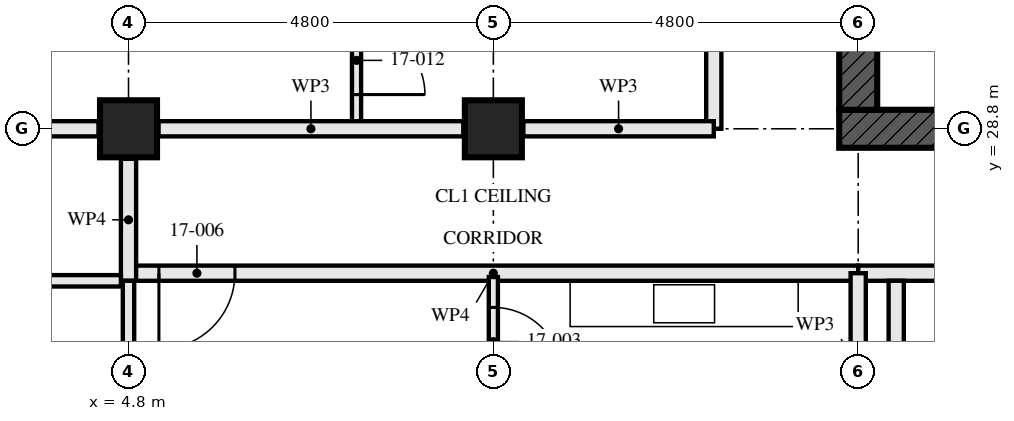
"""IFC4 building model, lengths in metres.
Left out: names, types, materials, properties, quantities, classifications, styles, units other than length and angle.
Written with IfcOpenShell. Run it as: python <this file> out.ifc"""

import sys

from ifc_helpers import new_model, si_unit, direction, frame, frame_2d, origin, origin_2d, place, context, subcontext, project, spatial, rectangle, hollow_rectangle, extrude, element, fill, save


model = new_model("IFC4")
c1 = context("Model", 3, precision=1e-05, world=origin(), true_north=direction((0.0, 1.0)))
c2 = subcontext(c1, "Body", "Model", "MODEL_VIEW")
j1 = project(units=[si_unit("LENGTHUNIT", "METRE"), si_unit("PLANEANGLEUNIT", "RADIAN")], contexts=[c1])
p1 = place(None, origin())
s1 = spatial("IfcSite", under=j1, at=p1, CompositionType="ELEMENT")
p2 = place(p1, origin())
s2 = spatial("IfcBuilding", under=s1, at=p2, CompositionType="ELEMENT")
p3 = place(p2, frame((0.0, 0.0, 65.5)))
s3 = spatial("IfcBuildingStorey", under=s2, at=p3, CompositionType="ELEMENT", Elevation=65.5)
for number, where, z_axis, x_axis in (
    (1, (4.8, 28.8, 0.0), (0.0, 0.0, 1.0), (0.0, 1.0, 0.0)),
    (2, (9.6, 28.8, 0.0), (0.0, 0.0, 1.0), (0.0, 1.0, 0.0)),
):
    element("IfcColumn", number, at=place(p3, frame(where, z_axis=z_axis, x_axis=x_axis)), inside=s3, PredefinedType="COLUMN", context=c2, shape_type="SweptSolid", body=[
        extrude(hollow_rectangle(XDim=0.75, YDim=0.75, WallThickness=0.08, at=origin_2d()), origin(), (0.0, 0.0, 1.0), 3.5),
    ])
p4 = place(p3, frame((14.15, 28.8, -0.17), z_axis=(0.0, 0.0, 1.0), x_axis=(1.0, 0.0, 0.0)))
e3 = element("IfcWall", 3, at=p4, inside=s3, PredefinedType="SHEAR", context=c2, shape_type="SweptSolid", body=[
    extrude(rectangle(XDim=14.9, YDim=0.5, at=frame_2d((7.45, 0.0))), origin(), (0.0, 0.0, 1.0), 3.5),
])
p5 = place(p4, frame((6.85, 0.0, 0.17)))
e4 = element("IfcOpeningElement", 4, at=p5, cuts=e3, PredefinedType="OPENING", context=c2, shape_type="SweptSolid", body=[
    extrude(rectangle(XDim=1.2, YDim=2.1, at=frame_2d((0.6, 1.05))), frame((0.0, 0.26, 0.0), z_axis=(0.0, -1.0, 0.0), x_axis=(1.0, 0.0, 0.0)), (0.0, 0.0, 1.0), 0.521),
])
p6 = place(p3, frame((14.4, 42.95, -0.17), z_axis=(0.0, 0.0, 1.0), x_axis=(0.0, -1.0, 0.0)))
e5 = element("IfcWall", 5, at=p6, inside=s3, PredefinedType="SHEAR", context=c2, shape_type="SweptSolid", body=[
    extrude(rectangle(XDim=13.9, YDim=0.5, at=frame_2d((6.95, 0.0))), origin(), (0.0, 0.0, 1.0), 3.5),
])
p7 = place(p6, frame((6.35, 0.0, 0.17)))
e6 = element("IfcOpeningElement", 6, at=p7, cuts=e5, PredefinedType="OPENING", context=c2, shape_type="SweptSolid", body=[
    extrude(rectangle(XDim=1.2, YDim=2.1, at=frame_2d((0.6, 1.05))), frame((0.0, 0.26, 0.0), z_axis=(0.0, -1.0, 0.0), x_axis=(1.0, 0.0, 0.0)), (0.0, 0.0, 1.0), 0.521),
])
p8 = place(p3, frame((4.8, 23.8, 0.0), z_axis=(0.0, 0.0, 1.0), x_axis=(0.0, 1.0, 0.0)))
e7 = element("IfcWall", 7, at=p8, inside=s3, PredefinedType="PARTITIONING", context=c2, shape_type="SweptSolid", body=[
    extrude(rectangle(XDim=3.0, YDim=0.15, at=frame_2d((1.5, 0.0))), origin(), (0.0, 0.0, 1.0), 2.55),
])
p9 = place(p8, frame((1.05, 0.0, 0.0)))
e8 = element("IfcOpeningElement", 8, at=p9, cuts=e7, PredefinedType="OPENING", context=c2, shape_type="SweptSolid", body=[
    extrude(rectangle(XDim=0.9, YDim=2.1, at=frame_2d((0.45, 1.05))), frame((0.0, 0.085, 0.0), z_axis=(0.0, -1.0, 0.0), x_axis=(1.0, 0.0, 0.0)), (0.0, 0.0, 1.0), 0.171),
])
p10 = place(p3, frame((9.6, 22.2, 0.0), z_axis=(0.0, 0.0, 1.0), x_axis=(0.0, 1.0, 0.0)))
e9 = element("IfcWall", 9, at=p10, inside=s3, PredefinedType="PARTITIONING", context=c2, shape_type="SweptSolid", body=[
    extrude(rectangle(XDim=4.65, YDim=0.12, at=frame_2d((2.325, 0.0))), origin(), (0.0, 0.0, 1.0), 2.55),
])
p11 = place(p10, frame((3.35, 0.0, 0.0)))
e10 = element("IfcOpeningElement", 10, at=p11, cuts=e9, PredefinedType="OPENING", context=c2, shape_type="SweptSolid", body=[
    extrude(rectangle(XDim=0.9, YDim=2.1, at=frame_2d((0.45, 1.05))), frame((0.0, 0.071, 0.0), z_axis=(0.0, -1.0, 0.0), x_axis=(1.0, 0.0, 0.0)), (0.0, 0.0, 1.0), 0.141),
])
p12 = place(p3, frame((4.8, 26.9, 0.0), z_axis=(0.0, 0.0, 1.0), x_axis=(1.0, 0.0, 0.0)))
e11 = element("IfcWall", 11, at=p12, inside=s3, PredefinedType="PARTITIONING", context=c2, shape_type="SweptSolid", body=[
    extrude(rectangle(XDim=9.6, YDim=0.2, at=frame_2d((4.8, 0.0))), origin(), (0.0, 0.0, 1.0), 3.33),
])
p13 = place(p12, frame((0.4, 0.0, 0.0)))
e12 = element("IfcOpeningElement", 12, at=p13, cuts=e11, PredefinedType="OPENING", context=c2, shape_type="SweptSolid", body=[
    extrude(rectangle(XDim=1.0, YDim=2.1, at=frame_2d((0.5, 1.05))), frame((0.0, 0.111, 0.0), z_axis=(0.0, -1.0, 0.0), x_axis=(1.0, 0.0, 0.0)), (0.0, 0.0, 1.0), 0.221),
])
p14 = place(p3, frame((4.8, 26.8, 0.0), z_axis=(0.0, 0.0, 1.0), x_axis=(0.0, 1.0, 0.0)))
e13 = element("IfcWall", 13, at=p14, inside=s3, PredefinedType="PARTITIONING", context=c2, shape_type="SweptSolid", body=[
    extrude(rectangle(XDim=1.605, YDim=0.2, at=frame_2d((0.802, 0.0))), origin(), (0.0, 0.0, 1.0), 3.33),
])
p15 = place(p3, frame((7.8, 33.6, 0.0), z_axis=(0.0, 0.0, 1.0), x_axis=(0.0, -1.0, 0.0)))
e14 = element("IfcWall", 14, at=p15, inside=s3, PredefinedType="PARTITIONING", context=c2, shape_type="SweptSolid", body=[
    extrude(rectangle(XDim=4.8, YDim=0.12, at=frame_2d((2.4, 0.0))), origin(), (0.0, 0.0, 1.0), 3.33),
])
p16 = place(p15, frame((3.45, 0.0, 0.0)))
e15 = element("IfcOpeningElement", 15, at=p16, cuts=e14, PredefinedType="OPENING", context=c2, shape_type="SweptSolid", body=[
    extrude(rectangle(XDim=0.9, YDim=2.1, at=frame_2d((0.45, 1.05))), frame((0.0, 0.071, 0.0), z_axis=(0.0, -1.0, 0.0), x_axis=(1.0, 0.0, 0.0)), (0.0, 0.0, 1.0), 0.141),
])
p17 = place(p3, frame((12.5, 43.2, 0.0), z_axis=(0.0, 0.0, 1.0), x_axis=(0.0, -1.0, 0.0)))
e16 = element("IfcWall", 16, at=p17, inside=s3, PredefinedType="PARTITIONING", context=c2, shape_type="SweptSolid", body=[
    extrude(rectangle(XDim=14.4, YDim=0.2, at=frame_2d((7.2, 0.0))), origin(), (0.0, 0.0, 1.0), 2.55),
])
p18 = place(p17, frame((1.4, 0.0, 0.0)))
e17 = element("IfcOpeningElement", 17, at=p18, cuts=e16, PredefinedType="OPENING", context=c2, shape_type="SweptSolid", body=[
    extrude(rectangle(XDim=1.0, YDim=2.1, at=frame_2d((0.5, 1.05))), frame((0.0, 0.111, 0.0), z_axis=(0.0, -1.0, 0.0), x_axis=(1.0, 0.0, 0.0)), (0.0, 0.0, 1.0), 0.221),
])
p19 = place(p17, frame((10.0, 0.0, 0.0)))
e18 = element("IfcOpeningElement", 18, at=p19, cuts=e16, PredefinedType="OPENING", context=c2, shape_type="SweptSolid", body=[
    extrude(rectangle(XDim=1.0, YDim=2.1, at=frame_2d((0.5, 1.05))), frame((0.0, 0.111, 0.0), z_axis=(0.0, -1.0, 0.0), x_axis=(1.0, 0.0, 0.0)), (0.0, 0.0, 1.0), 0.221),
])
p20 = place(p3, frame((14.9, 22.1, 0.0), z_axis=(0.0, 0.0, 1.0), x_axis=(0.0, 1.0, 0.0)))
e19 = element("IfcWall", 19, at=p20, inside=s3, PredefinedType="SOLIDWALL", context=c2, shape_type="SweptSolid", body=[
    extrude(rectangle(XDim=4.7, YDim=0.2, at=frame_2d((2.35, 0.0))), origin(), (0.0, 0.0, 1.0), 2.99),
])
p21 = place(p3, frame((14.4, 26.9, 0.0), z_axis=(0.0, 0.0, 1.0), x_axis=(1.0, 0.0, 0.0)))
e20 = element("IfcWall", 20, at=p21, inside=s3, PredefinedType="SOLIDWALL", context=c2, shape_type="SweptSolid", body=[
    extrude(rectangle(XDim=3.4, YDim=0.2, at=frame_2d((1.7, 0.0))), origin(), (0.0, 0.0, 1.0), 3.33),
])
p22 = place(p21, frame((1.4, 0.0, 0.0)))
e21 = element("IfcOpeningElement", 21, at=p22, cuts=e20, PredefinedType="OPENING", context=c2, shape_type="SweptSolid", body=[
    extrude(rectangle(XDim=1.0, YDim=2.1, at=frame_2d((0.5, 1.05))), frame((0.0, 0.111, 0.0), z_axis=(0.0, -1.0, 0.0), x_axis=(1.0, 0.0, 0.0)), (0.0, 0.0, 1.0), 0.221),
])
p23 = place(p3, frame((12.5, 28.8, 0.0), z_axis=(0.0, 0.0, 1.0), x_axis=(-1.0, 0.0, 0.0)))
e22 = element("IfcWall", 22, at=p23, inside=s3, PredefinedType="PARTITIONING", context=c2, shape_type="SweptSolid", body=[
    extrude(rectangle(XDim=2.505, YDim=0.2, at=frame_2d((1.252, 0.0))), origin(), (0.0, 0.0, 1.0), 2.32),
])
p24 = place(p3, frame((9.205, 28.8, 0.0), z_axis=(0.0, 0.0, 1.0), x_axis=(-1.0, 0.0, 0.0)))
e23 = element("IfcWall", 23, at=p24, inside=s3, PredefinedType="PARTITIONING", context=c2, shape_type="SweptSolid", body=[
    extrude(rectangle(XDim=4.01, YDim=0.2, at=frame_2d((2.005, 0.0))), origin(), (0.0, 0.0, 1.0), 2.32),
])
p25 = place(p3, frame((4.405, 28.8, 0.0), z_axis=(0.0, 0.0, 1.0), x_axis=(-1.0, 0.0, 0.0)))
e24 = element("IfcWall", 24, at=p25, inside=s3, PredefinedType="PARTITIONING", context=c2, shape_type="SweptSolid", body=[
    extrude(rectangle(XDim=4.085, YDim=0.2, at=frame_2d((2.042, 0.0))), origin(), (0.0, 0.0, 1.0), 2.32),
])
p26 = place(p3, frame((14.4, 24.395, 0.0), z_axis=(0.0, 0.0, 1.0), x_axis=(0.0, 1.0, 0.0)))
e25 = element("IfcWall", 25, at=p26, inside=s3, PredefinedType="PARTITIONING", context=c2, shape_type="SweptSolid", body=[
    extrude(rectangle(XDim=2.505, YDim=0.2, at=frame_2d((1.252, 0.0))), origin(), (0.0, 0.0, 1.0), 2.32),
])
p27 = place(p3, frame((-0.43, 26.8, 0.0), z_axis=(0.0, 0.0, 1.0), x_axis=(1.0, 0.0, 0.0)))
e26 = element("IfcWall", 26, at=p27, inside=s3, PredefinedType="PARTITIONING", context=c2, shape_type="SweptSolid", body=[
    extrude(rectangle(XDim=5.13, YDim=0.15, at=frame_2d((2.565, 0.0))), origin(), (0.0, 0.0, 1.0), 2.32),
])
p28 = place(p11, frame((0.9, 0.0, 0.0), z_axis=(0.0, 0.0, 1.0), x_axis=(-1.0, 0.0, 0.0)))
e27 = element("IfcDoor", 27, at=p28, inside=s3, OperationType="SINGLE_SWING_LEFT", PredefinedType="DOOR", context=c2, shape_type="SweptSolid", body=[
    extrude(rectangle(XDim=0.9, YDim=2.1, at=frame_2d((0.45, 1.05))), frame((0.0, 0.022, 0.0), z_axis=(0.0, -1.0, 0.0), x_axis=(1.0, 0.0, 0.0)), (0.0, 0.0, 1.0), 0.044),
])
fill(e10, e27)
p29 = place(p13, frame((1.0, 0.0, 0.0), z_axis=(0.0, 0.0, 1.0), x_axis=(-1.0, 0.0, 0.0)))
e28 = element("IfcDoor", 28, at=p29, inside=s3, OperationType="SINGLE_SWING_LEFT", PredefinedType="DOOR", context=c2, shape_type="SweptSolid", body=[
    extrude(rectangle(XDim=1.0, YDim=2.1, at=frame_2d((0.5, 1.05))), frame((0.0, 0.027, 0.0), z_axis=(0.0, -1.0, 0.0), x_axis=(1.0, 0.0, 0.0)), (0.0, 0.0, 1.0), 0.054),
])
fill(e12, e28)
p30 = place(p16, origin())
e29 = element("IfcDoor", 29, at=p30, inside=s3, OperationType="SINGLE_SWING_LEFT", PredefinedType="DOOR", context=c2, shape_type="SweptSolid", body=[
    extrude(rectangle(XDim=0.9, YDim=2.1, at=frame_2d((0.45, 1.05))), frame((0.0, 0.022, 0.0), z_axis=(0.0, -1.0, 0.0), x_axis=(1.0, 0.0, 0.0)), (0.0, 0.0, 1.0), 0.044),
])
fill(e15, e29)
save(model, sys.argv[1])
